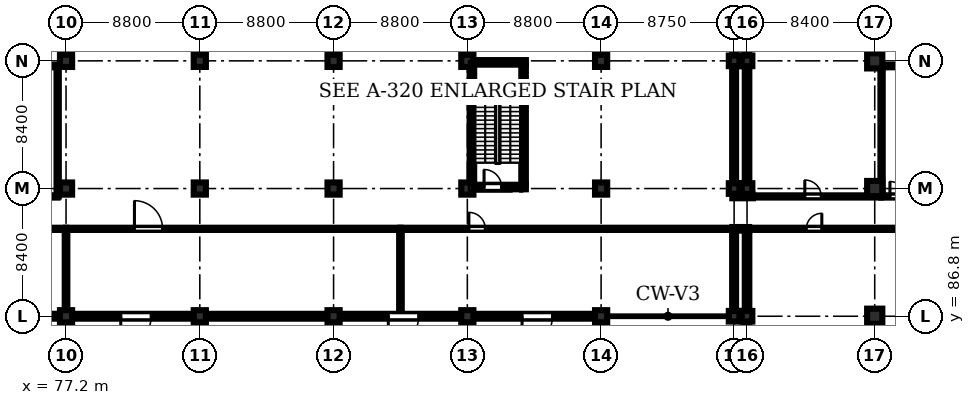
"""IFC4 building model, lengths in metres.
Left out: names, types, materials, properties, quantities, classifications, styles, units other than length and angle.
Written with IfcOpenShell. Run it as: python <this file> out.ifc"""

import sys

from ifc_helpers import new_model, si_unit, direction, frame, frame_2d, origin, origin_2d, place, context, subcontext, project, spatial, rectangle, extrude, element, fill, save


model = new_model("IFC4")
c1 = context("Model", 3, precision=1e-05, world=origin(), true_north=direction((0.0, 1.0)))
c2 = subcontext(c1, "Body", "Model", "MODEL_VIEW")
j1 = project(units=[si_unit("LENGTHUNIT", "METRE"), si_unit("PLANEANGLEUNIT", "RADIAN")], contexts=[c1])
p1 = place(None, origin())
s1 = spatial("IfcSite", under=j1, at=p1, CompositionType="ELEMENT")
p2 = place(p1, origin())
s2 = spatial("IfcBuilding", under=s1, at=p2, CompositionType="ELEMENT")
p3 = place(p2, origin())
s3 = spatial("IfcBuildingStorey", under=s2, at=p3, CompositionType="ELEMENT", Elevation=0.0)
for number, where, z_axis, x_axis in (
    (1, (77.2, 86.8, 0.0), (0.0, 0.0, 1.0), (1.0, 0.0, 0.0)),
    (2, (77.2, 95.2, 0.0), (0.0, 0.0, 1.0), (1.0, 0.0, 0.0)),
    (3, (77.2, 103.6, 0.0), (0.0, 0.0, 1.0), (1.0, 0.0, 0.0)),
    (4, (86.0, 86.8, 0.0), (0.0, 0.0, 1.0), (1.0, 0.0, 0.0)),
    (5, (86.0, 95.2, 0.0), (0.0, 0.0, 1.0), (1.0, 0.0, 0.0)),
    (6, (86.0, 103.6, 0.0), (0.0, 0.0, 1.0), (1.0, 0.0, 0.0)),
    (7, (94.8, 86.8, 0.0), (0.0, 0.0, 1.0), (1.0, 0.0, 0.0)),
    (8, (94.8, 95.2, 0.0), (0.0, 0.0, 1.0), (1.0, 0.0, 0.0)),
    (9, (94.8, 103.6, 0.0), (0.0, 0.0, 1.0), (1.0, 0.0, 0.0)),
    (10, (103.6, 86.8, 0.0), (0.0, 0.0, 1.0), (1.0, 0.0, 0.0)),
    (11, (103.6, 95.2, 0.0), (0.0, 0.0, 1.0), (1.0, 0.0, 0.0)),
    (12, (103.6, 103.6, 0.0), (0.0, 0.0, 1.0), (1.0, 0.0, 0.0)),
    (13, (112.4, 86.8, 0.0), (0.0, 0.0, 1.0), (1.0, 0.0, 0.0)),
    (14, (112.4, 95.2, 0.0), (0.0, 0.0, 1.0), (1.0, 0.0, 0.0)),
    (15, (112.4, 103.6, 0.0), (0.0, 0.0, 1.0), (1.0, 0.0, 0.0)),
):
    element("IfcColumn", number, at=place(p3, frame(where, z_axis=z_axis, x_axis=x_axis)), inside=s3, PredefinedType="COLUMN", context=c2, shape_type="SweptSolid", body=[
        extrude(rectangle(XDim=0.8, YDim=0.8, at=origin_2d()), origin(), (0.0, 0.0, 1.0), 5.18),
    ])
for number, where, z_axis, x_axis in (
    (16, (121.15, 86.8, 0.0), (0.0, 0.0, 1.0), (1.0, 0.0, 0.0)),
    (17, (121.15, 95.2, 0.0), (0.0, 0.0, 1.0), (1.0, 0.0, 0.0)),
    (18, (121.15, 103.6, 0.0), (0.0, 0.0, 1.0), (1.0, 0.0, 0.0)),
    (19, (122.0, 86.8, 0.0), (0.0, 0.0, 1.0), (1.0, 0.0, 0.0)),
    (20, (122.0, 95.2, 0.0), (0.0, 0.0, 1.0), (1.0, 0.0, 0.0)),
    (21, (122.0, 103.6, 0.0), (0.0, 0.0, 1.0), (1.0, 0.0, 0.0)),
):
    element("IfcColumn", number, at=place(p3, frame(where, z_axis=z_axis, x_axis=x_axis)), inside=s3, PredefinedType="COLUMN", context=c2, shape_type="SweptSolid", body=[
        extrude(rectangle(XDim=0.7, YDim=0.7, at=origin_2d()), origin(), (0.0, 0.0, 1.0), 5.18),
    ])
for number, where, z_axis, x_axis in (
    (22, (130.4, 86.8, 0.0), (0.0, 0.0, 1.0), (1.0, 0.0, 0.0)),
    (23, (130.4, 95.2, 0.0), (0.0, 0.0, 1.0), (1.0, 0.0, 0.0)),
    (24, (130.4, 103.6, 0.0), (0.0, 0.0, 1.0), (1.0, 0.0, 0.0)),
):
    element("IfcColumn", number, at=place(p3, frame(where, z_axis=z_axis, x_axis=x_axis)), inside=s3, PredefinedType="COLUMN", context=c2, shape_type="SweptSolid", body=[
        extrude(rectangle(XDim=1.0, YDim=1.0, at=origin_2d()), origin(), (0.0, 0.0, 1.0), 5.18),
    ])
p4 = place(p3, frame((103.75, 95.3, 0.0), z_axis=(0.0, 0.0, 1.0), x_axis=(1.0, 0.0, 0.0)))
e25 = element("IfcWall", 25, at=p4, inside=s3, PredefinedType="SHEAR", context=c2, shape_type="SweptSolid", body=[
    extrude(rectangle(XDim=3.7, YDim=0.3, at=frame_2d((1.85, 0.0))), origin(), (0.0, 0.0, 1.0), 5.18),
])
p5 = place(p4, frame((0.95, 0.0, 0.0)))
e26 = element("IfcOpeningElement", 26, at=p5, cuts=e25, PredefinedType="OPENING", context=c2, shape_type="SweptSolid", body=[
    extrude(rectangle(XDim=1.15, YDim=2.15, at=frame_2d((0.575, 1.075))), frame((0.0, 0.16, 0.0), z_axis=(0.0, -1.0, 0.0), x_axis=(1.0, 0.0, 0.0)), (0.0, 0.0, 1.0), 0.32),
])
p6 = place(p3, frame((103.75, 103.5, 0.0), z_axis=(0.0, 0.0, 1.0), x_axis=(1.0, 0.0, 0.0)))
e27 = element("IfcWall", 27, at=p6, inside=s3, PredefinedType="SHEAR", context=c2, shape_type="SweptSolid", body=[
    extrude(rectangle(XDim=3.7, YDim=0.3, at=frame_2d((1.85, 0.0))), origin(), (0.0, 0.0, 1.0), 5.18),
])
for number, where, z_axis, x_axis in (
    (28, (103.9, 95.45, 0.0), (0.0, 0.0, 1.0), (0.0, 1.0, 0.0)),
    (29, (107.3, 95.45, 0.0), (0.0, 0.0, 1.0), (0.0, 1.0, 0.0)),
):
    element("IfcWall", number, at=place(p3, frame(where, z_axis=z_axis, x_axis=x_axis)), inside=s3, PredefinedType="SHEAR", context=c2, shape_type="SweptSolid", body=[
        extrude(rectangle(XDim=7.9, YDim=0.3, at=frame_2d((3.95, 0.0))), origin(), (0.0, 0.0, 1.0), 5.18),
    ])
p7 = place(p3, frame((76.8, 86.8, 0.0), z_axis=(0.0, 0.0, 1.0), x_axis=(-1.0, 0.0, 0.0)))
e30 = element("IfcWall", 30, at=p7, inside=s3, PredefinedType="STANDARD", context=c2, shape_type="SweptSolid", body=[
    extrude(rectangle(XDim=8.0, YDim=0.32, at=frame_2d((4.0, 0.0))), origin(), (0.0, 0.0, 1.0), 4.53),
])
p8 = place(p7, frame((2.8, 0.0, 0.95)))
e31 = element("IfcOpeningElement", 31, at=p8, cuts=e30, PredefinedType="OPENING", context=c2, shape_type="SweptSolid", body=[
    extrude(rectangle(XDim=2.0, YDim=2.2, at=frame_2d((1.0, 1.1))), frame((0.0, 0.17, 0.0), z_axis=(0.0, -1.0, 0.0), x_axis=(1.0, 0.0, 0.0)), (0.0, 0.0, 1.0), 0.34),
])
p9 = place(p3, frame((85.6, 86.8, 0.0), z_axis=(0.0, 0.0, 1.0), x_axis=(-1.0, 0.0, 0.0)))
e32 = element("IfcWall", 32, at=p9, inside=s3, PredefinedType="STANDARD", context=c2, shape_type="SweptSolid", body=[
    extrude(rectangle(XDim=8.0, YDim=0.32, at=frame_2d((4.0, 0.0))), origin(), (0.0, 0.0, 1.0), 4.53),
])
p10 = place(p9, frame((2.8, 0.0, 0.0)))
e33 = element("IfcOpeningElement", 33, at=p10, cuts=e32, PredefinedType="OPENING", context=c2, shape_type="SweptSolid", body=[
    extrude(rectangle(XDim=2.0, YDim=2.4, at=frame_2d((1.0, 1.2))), frame((0.0, 0.17, 0.0), z_axis=(0.0, -1.0, 0.0), x_axis=(1.0, 0.0, 0.0)), (0.0, 0.0, 1.0), 0.34),
])
p11 = place(p3, frame((94.4, 86.8, 0.0), z_axis=(0.0, 0.0, 1.0), x_axis=(-1.0, 0.0, 0.0)))
e34 = element("IfcWall", 34, at=p11, inside=s3, PredefinedType="STANDARD", context=c2, shape_type="SweptSolid", body=[
    extrude(rectangle(XDim=8.0, YDim=0.32, at=frame_2d((4.0, 0.0))), origin(), (0.0, 0.0, 1.0), 4.53),
])
p12 = place(p11, frame((2.8, 0.0, 0.95)))
e35 = element("IfcOpeningElement", 35, at=p12, cuts=e34, PredefinedType="OPENING", context=c2, shape_type="SweptSolid", body=[
    extrude(rectangle(XDim=2.0, YDim=2.2, at=frame_2d((1.0, 1.1))), frame((0.0, 0.17, 0.0), z_axis=(0.0, -1.0, 0.0), x_axis=(1.0, 0.0, 0.0)), (0.0, 0.0, 1.0), 0.34),
])
p13 = place(p3, frame((103.2, 86.8, 0.0), z_axis=(0.0, 0.0, 1.0), x_axis=(-1.0, 0.0, 0.0)))
e36 = element("IfcWall", 36, at=p13, inside=s3, PredefinedType="STANDARD", context=c2, shape_type="SweptSolid", body=[
    extrude(rectangle(XDim=8.0, YDim=0.32, at=frame_2d((4.0, 0.0))), origin(), (0.0, 0.0, 1.0), 4.53),
])
p14 = place(p13, frame((2.8, 0.0, 0.0)))
e37 = element("IfcOpeningElement", 37, at=p14, cuts=e36, PredefinedType="OPENING", context=c2, shape_type="SweptSolid", body=[
    extrude(rectangle(XDim=2.0, YDim=2.4, at=frame_2d((1.0, 1.2))), frame((0.0, 0.17, 0.0), z_axis=(0.0, -1.0, 0.0), x_axis=(1.0, 0.0, 0.0)), (0.0, 0.0, 1.0), 0.34),
])
p15 = place(p3, frame((112.0, 86.8, 0.0), z_axis=(0.0, 0.0, 1.0), x_axis=(-1.0, 0.0, 0.0)))
e38 = element("IfcWall", 38, at=p15, inside=s3, PredefinedType="STANDARD", context=c2, shape_type="SweptSolid", body=[
    extrude(rectangle(XDim=8.0, YDim=0.32, at=frame_2d((4.0, 0.0))), origin(), (0.0, 0.0, 1.0), 4.53),
])
p16 = place(p15, frame((2.8, 0.0, 0.0)))
e39 = element("IfcOpeningElement", 39, at=p16, cuts=e38, PredefinedType="OPENING", context=c2, shape_type="SweptSolid", body=[
    extrude(rectangle(XDim=2.0, YDim=2.4, at=frame_2d((1.0, 1.2))), frame((0.0, 0.17, 0.0), z_axis=(0.0, -1.0, 0.0), x_axis=(1.0, 0.0, 0.0)), (0.0, 0.0, 1.0), 0.34),
])
p17 = place(p3, frame((121.15, 92.42, 0.0), z_axis=(0.0, 0.0, 1.0), x_axis=(0.0, -1.0, 0.0)))
e40 = element("IfcWall", 40, at=p17, inside=s3, PredefinedType="STANDARD", context=c2, shape_type="SweptSolid", body=[
    extrude(rectangle(XDim=5.27, YDim=0.26, at=frame_2d((2.635, 0.0))), origin(), (0.0, 0.0, 1.0), 4.53),
])
p18 = place(p3, frame((121.15, 103.25, 0.0), z_axis=(0.0, 0.0, 1.0), x_axis=(0.0, -1.0, 0.0)))
e41 = element("IfcWall", 41, at=p18, inside=s3, PredefinedType="STANDARD", context=c2, shape_type="SweptSolid", body=[
    extrude(rectangle(XDim=7.7, YDim=0.26, at=frame_2d((3.85, 0.0))), origin(), (0.0, 0.0, 1.0), 4.53),
])
p19 = place(p3, frame((121.15, 107.42, 0.0), z_axis=(0.0, 0.0, 1.0), x_axis=(0.0, -1.0, 0.0)))
e42 = element("IfcWall", 42, at=p19, inside=s3, PredefinedType="STANDARD", context=c2, shape_type="SweptSolid", body=[
    extrude(rectangle(XDim=3.47, YDim=0.26, at=frame_2d((1.735, 0.0))), origin(), (0.0, 0.0, 1.0), 4.53),
])
p20 = place(p3, frame((122.0, 78.75, 0.0), z_axis=(0.0, 0.0, 1.0), x_axis=(0.0, 1.0, 0.0)))
e43 = element("IfcWall", 43, at=p20, inside=s3, PredefinedType="STANDARD", context=c2, shape_type="SweptSolid", body=[
    extrude(rectangle(XDim=7.7, YDim=0.3, at=frame_2d((3.85, 0.0))), origin(), (0.0, 0.0, 1.0), 4.43),
])
p21 = place(p3, frame((122.0, 87.15, 0.0), z_axis=(0.0, 0.0, 1.0), x_axis=(0.0, 1.0, 0.0)))
e44 = element("IfcWall", 44, at=p21, inside=s3, PredefinedType="STANDARD", context=c2, shape_type="SweptSolid", body=[
    extrude(rectangle(XDim=5.27, YDim=0.3, at=frame_2d((2.635, 0.0))), origin(), (0.0, 0.0, 1.0), 4.43),
])
p22 = place(p3, frame((122.14, 92.55, 0.0), z_axis=(0.0, 0.0, 1.0), x_axis=(-1.0, 0.0, 0.0)))
e45 = element("IfcWall", 45, at=p22, inside=s3, PredefinedType="STANDARD", context=c2, shape_type="SweptSolid", body=[
    extrude(rectangle(XDim=1.11, YDim=0.24, at=frame_2d((0.555, 0.0))), origin(), (0.0, 0.0, 1.0), 5.18),
])
p23 = place(p3, frame((121.03, 94.68, 0.0), z_axis=(0.0, 0.0, 1.0), x_axis=(1.0, 0.0, 0.0)))
e46 = element("IfcWall", 46, at=p23, inside=s3, PredefinedType="STANDARD", context=c2, shape_type="SweptSolid", body=[
    extrude(rectangle(XDim=1.36, YDim=0.24, at=frame_2d((0.68, 0.0))), origin(), (0.0, 0.0, 1.0), 5.18),
])
p24 = place(p3, frame((122.0, 95.55, 0.0), z_axis=(0.0, 0.0, 1.0), x_axis=(0.0, 1.0, 0.0)))
e47 = element("IfcWall", 47, at=p24, inside=s3, PredefinedType="STANDARD", context=c2, shape_type="SweptSolid", body=[
    extrude(rectangle(XDim=7.7, YDim=0.3, at=frame_2d((3.85, 0.0))), origin(), (0.0, 0.0, 1.0), 4.43),
])
p25 = place(p3, frame((122.0, 103.95, 0.0), z_axis=(0.0, 0.0, 1.0), x_axis=(0.0, 1.0, 0.0)))
e48 = element("IfcWall", 48, at=p25, inside=s3, PredefinedType="STANDARD", context=c2, shape_type="SweptSolid", body=[
    extrude(rectangle(XDim=3.54, YDim=0.3, at=frame_2d((1.77, 0.0))), origin(), (0.0, 0.0, 1.0), 4.43),
])
p26 = place(p3, frame((69.25, 94.68, 0.0), z_axis=(0.0, 0.0, 1.0), x_axis=(1.0, 0.0, 0.0)))
e49 = element("IfcWall", 49, at=p26, inside=s3, PredefinedType="PARTITIONING", context=c2, shape_type="SweptSolid", body=[
    extrude(rectangle(XDim=7.4, YDim=0.15, at=frame_2d((3.7, 0.0))), origin(), (0.0, 0.0, 1.0), 5.18),
])
p27 = place(p26, frame((1.15, 0.0, 0.0)))
e50 = element("IfcOpeningElement", 50, at=p27, cuts=e49, PredefinedType="OPENING", context=c2, shape_type="SweptSolid", body=[
    extrude(rectangle(XDim=1.0, YDim=2.12, at=frame_2d((0.5, 1.06))), frame((0.0, 0.085, 0.0), z_axis=(0.0, -1.0, 0.0), x_axis=(1.0, 0.0, 0.0)), (0.0, 0.0, 1.0), 0.17),
])
p28 = place(p26, frame((4.55, 0.0, 0.0)))
e51 = element("IfcOpeningElement", 51, at=p28, cuts=e49, PredefinedType="OPENING", context=c2, shape_type="SweptSolid", body=[
    extrude(rectangle(XDim=0.92, YDim=2.1, at=frame_2d((0.46, 1.05))), frame((0.0, 0.085, 0.0), z_axis=(0.0, -1.0, 0.0), x_axis=(1.0, 0.0, 0.0)), (0.0, 0.0, 1.0), 0.17),
])
p29 = place(p3, frame((69.25, 103.25, 0.0), z_axis=(0.0, 0.0, 1.0), x_axis=(1.0, 0.0, 0.0)))
e52 = element("IfcWall", 52, at=p29, inside=s3, PredefinedType="PARTITIONING", context=c2, shape_type="SweptSolid", body=[
    extrude(rectangle(XDim=7.4, YDim=0.15, at=frame_2d((3.7, 0.0))), origin(), (0.0, 0.0, 1.0), 5.18),
])
p30 = place(p3, frame((76.65, 94.68, 0.0), z_axis=(0.0, 0.0, 1.0), x_axis=(0.0, 1.0, 0.0)))
e53 = element("IfcWall", 53, at=p30, inside=s3, PredefinedType="PARTITIONING", context=c2, shape_type="SweptSolid", body=[
    extrude(rectangle(XDim=8.57, YDim=0.15, at=frame_2d((4.285, 0.0))), origin(), (0.0, 0.0, 1.0), 5.18),
])
p31 = place(p3, frame((50.92, 92.55, 0.0), z_axis=(0.0, 0.0, 1.0), x_axis=(1.0, 0.0, 0.0)))
e54 = element("IfcWall", 54, at=p31, inside=s3, PredefinedType="PARTITIONING", context=c2, shape_type="SweptSolid", body=[
    extrude(rectangle(XDim=26.28, YDim=0.145, at=frame_2d((13.14, 0.0))), origin(), (0.0, 0.0, 1.0), 5.18),
])
p32 = place(p31, frame((4.5, 0.0, 0.0)))
e55 = element("IfcOpeningElement", 55, at=p32, cuts=e54, PredefinedType="OPENING", context=c2, shape_type="SweptSolid", body=[
    extrude(rectangle(XDim=1.85, YDim=2.25, at=frame_2d((0.925, 1.125))), frame((0.0, 0.083, 0.0), z_axis=(0.0, -1.0, 0.0), x_axis=(1.0, 0.0, 0.0)), (0.0, 0.0, 1.0), 0.165),
])
p33 = place(p3, frame((77.2, 92.55, 0.0), z_axis=(0.0, 0.0, 1.0), x_axis=(1.0, 0.0, 0.0)))
e56 = element("IfcWall", 56, at=p33, inside=s3, PredefinedType="PARTITIONING", context=c2, shape_type="SweptSolid", body=[
    extrude(rectangle(XDim=22.0, YDim=0.145, at=frame_2d((11.0, 0.0))), origin(), (0.0, 0.0, 1.0), 5.18),
])
p34 = place(p33, frame((4.5, 0.0, 0.0)))
e57 = element("IfcOpeningElement", 57, at=p34, cuts=e56, PredefinedType="OPENING", context=c2, shape_type="SweptSolid", body=[
    extrude(rectangle(XDim=1.85, YDim=2.25, at=frame_2d((0.925, 1.125))), frame((0.0, 0.083, 0.0), z_axis=(0.0, -1.0, 0.0), x_axis=(1.0, 0.0, 0.0)), (0.0, 0.0, 1.0), 0.165),
])
p35 = place(p3, frame((77.2, 86.95, 0.0), z_axis=(0.0, 0.0, 1.0), x_axis=(0.0, 1.0, 0.0)))
e58 = element("IfcWall", 58, at=p35, inside=s3, PredefinedType="PARTITIONING", context=c2, shape_type="SweptSolid", body=[
    extrude(rectangle(XDim=5.6, YDim=0.172, at=frame_2d((2.8, 0.0))), origin(), (0.0, 0.0, 1.0), 4.53),
])
p36 = place(p3, frame((99.2, 92.55, 0.0), z_axis=(0.0, 0.0, 1.0), x_axis=(1.0, 0.0, 0.0)))
e59 = element("IfcWall", 59, at=p36, inside=s3, PredefinedType="PARTITIONING", context=c2, shape_type="SweptSolid", body=[
    extrude(rectangle(XDim=21.82, YDim=0.145, at=frame_2d((10.91, 0.0))), origin(), (0.0, 0.0, 1.0), 5.18),
])
p37 = place(p36, frame((4.5, 0.0, 0.0)))
e60 = element("IfcOpeningElement", 60, at=p37, cuts=e59, PredefinedType="OPENING", context=c2, shape_type="SweptSolid", body=[
    extrude(rectangle(XDim=1.08, YDim=2.15, at=frame_2d((0.54, 1.075))), frame((0.0, 0.083, 0.0), z_axis=(0.0, -1.0, 0.0), x_axis=(1.0, 0.0, 0.0)), (0.0, 0.0, 1.0), 0.165),
])
p38 = place(p3, frame((99.2, 86.95, 0.0), z_axis=(0.0, 0.0, 1.0), x_axis=(0.0, 1.0, 0.0)))
e61 = element("IfcWall", 61, at=p38, inside=s3, PredefinedType="PARTITIONING", context=c2, shape_type="SweptSolid", body=[
    extrude(rectangle(XDim=5.6, YDim=0.172, at=frame_2d((2.8, 0.0))), origin(), (0.0, 0.0, 1.0), 4.73),
])
p39 = place(p3, frame((130.85, 94.68, 0.0), z_axis=(0.0, 0.0, 1.0), x_axis=(1.0, 0.0, 0.0)))
e62 = element("IfcWall", 62, at=p39, inside=s3, PredefinedType="PARTITIONING", context=c2, shape_type="SweptSolid", body=[
    extrude(rectangle(XDim=5.35, YDim=0.15, at=frame_2d((2.675, 0.0))), origin(), (0.0, 0.0, 1.0), 5.18),
])
p40 = place(p39, frame((0.55, 0.0, 0.0)))
e63 = element("IfcOpeningElement", 63, at=p40, cuts=e62, PredefinedType="OPENING", context=c2, shape_type="SweptSolid", body=[
    extrude(rectangle(XDim=0.98, YDim=2.12, at=frame_2d((0.49, 1.06))), frame((0.0, 0.085, 0.0), z_axis=(0.0, -1.0, 0.0), x_axis=(1.0, 0.0, 0.0)), (0.0, 0.0, 1.0), 0.17),
])
p41 = place(p3, frame((130.85, 103.25, 0.0), z_axis=(0.0, 0.0, 1.0), x_axis=(1.0, 0.0, 0.0)))
e64 = element("IfcWall", 64, at=p41, inside=s3, PredefinedType="PARTITIONING", context=c2, shape_type="SweptSolid", body=[
    extrude(rectangle(XDim=5.35, YDim=0.15, at=frame_2d((2.675, 0.0))), origin(), (0.0, 0.0, 1.0), 5.18),
])
p42 = place(p3, frame((130.85, 94.68, 0.0), z_axis=(0.0, 0.0, 1.0), x_axis=(0.0, 1.0, 0.0)))
e65 = element("IfcWall", 65, at=p42, inside=s3, PredefinedType="PARTITIONING", context=c2, shape_type="SweptSolid", body=[
    extrude(rectangle(XDim=8.57, YDim=0.15, at=frame_2d((4.285, 0.0))), origin(), (0.0, 0.0, 1.0), 5.18),
])
p43 = place(p3, frame((122.4, 94.68, 0.0), z_axis=(0.0, 0.0, 1.0), x_axis=(1.0, 0.0, 0.0)))
e66 = element("IfcWall", 66, at=p43, inside=s3, PredefinedType="PARTITIONING", context=c2, shape_type="SweptSolid", body=[
    extrude(rectangle(XDim=8.4, YDim=0.145, at=frame_2d((4.2, 0.0))), origin(), (0.0, 0.0, 1.0), 5.18),
])
p44 = place(p43, frame((3.4, 0.0, 0.0)))
e67 = element("IfcOpeningElement", 67, at=p44, cuts=e66, PredefinedType="OPENING", context=c2, shape_type="SweptSolid", body=[
    extrude(rectangle(XDim=1.08, YDim=2.15, at=frame_2d((0.54, 1.075))), frame((0.0, 0.083, 0.0), z_axis=(0.0, -1.0, 0.0), x_axis=(1.0, 0.0, 0.0)), (0.0, 0.0, 1.0), 0.165),
])
p45 = place(p3, frame((122.15, 92.55, 0.0), z_axis=(0.0, 0.0, 1.0), x_axis=(1.0, 0.0, 0.0)))
e68 = element("IfcWall", 68, at=p45, inside=s3, PredefinedType="PARTITIONING", context=c2, shape_type="SweptSolid", body=[
    extrude(rectangle(XDim=12.45, YDim=0.145, at=frame_2d((6.225, 0.0))), origin(), (0.0, 0.0, 1.0), 5.18),
])
p46 = place(p45, frame((3.75, 0.0, 0.0)))
e69 = element("IfcOpeningElement", 69, at=p46, cuts=e68, PredefinedType="OPENING", context=c2, shape_type="SweptSolid", body=[
    extrude(rectangle(XDim=1.02, YDim=2.15, at=frame_2d((0.51, 1.075))), frame((0.0, 0.083, 0.0), z_axis=(0.0, -1.0, 0.0), x_axis=(1.0, 0.0, 0.0)), (0.0, 0.0, 1.0), 0.165),
])
p47 = place(p10, origin())
e70 = element("IfcDoor", 70, at=p47, inside=s3, OperationType="SINGLE_SWING_RIGHT", PredefinedType="DOOR", context=c2, shape_type="SweptSolid", body=[
    extrude(rectangle(XDim=2.0, YDim=2.4, at=frame_2d((1.0, 1.2))), frame((0.0, 0.025, 0.0), z_axis=(0.0, -1.0, 0.0), x_axis=(1.0, 0.0, 0.0)), (0.0, 0.0, 1.0), 0.05),
])
fill(e33, e70)
p48 = place(p12, origin())
e71 = element("IfcWindow", 71, at=p48, inside=s3, PartitioningType="DOUBLE_PANEL_VERTICAL", PredefinedType="WINDOW", context=c2, shape_type="SweptSolid", body=[
    extrude(rectangle(XDim=2.0, YDim=2.2, at=frame_2d((1.0, 1.1))), frame((0.0, 0.03, 0.0), z_axis=(0.0, -1.0, 0.0), x_axis=(1.0, 0.0, 0.0)), (0.0, 0.0, 1.0), 0.06),
])
fill(e35, e71)
p49 = place(p14, origin())
e72 = element("IfcDoor", 72, at=p49, inside=s3, OperationType="SINGLE_SWING_RIGHT", PredefinedType="DOOR", context=c2, shape_type="SweptSolid", body=[
    extrude(rectangle(XDim=2.0, YDim=2.4, at=frame_2d((1.0, 1.2))), frame((0.0, 0.025, 0.0), z_axis=(0.0, -1.0, 0.0), x_axis=(1.0, 0.0, 0.0)), (0.0, 0.0, 1.0), 0.05),
])
fill(e37, e72)
p50 = place(p16, origin())
e73 = element("IfcDoor", 73, at=p50, inside=s3, OperationType="SINGLE_SWING_RIGHT", PredefinedType="DOOR", context=c2, shape_type="SweptSolid", body=[
    extrude(rectangle(XDim=2.0, YDim=2.4, at=frame_2d((1.0, 1.2))), frame((0.0, 0.025, 0.0), z_axis=(0.0, -1.0, 0.0), x_axis=(1.0, 0.0, 0.0)), (0.0, 0.0, 1.0), 0.05),
])
fill(e39, e73)
p51 = place(p34, origin())
e74 = element("IfcDoor", 74, at=p51, inside=s3, OperationType="SINGLE_SWING_LEFT", PredefinedType="DOOR", context=c2, shape_type="SweptSolid", body=[
    extrude(rectangle(XDim=1.85, YDim=2.25, at=frame_2d((0.925, 1.125))), frame((0.0, 0.025, 0.0), z_axis=(0.0, -1.0, 0.0), x_axis=(1.0, 0.0, 0.0)), (0.0, 0.0, 1.0), 0.05),
])
fill(e57, e74)
p52 = place(p37, origin())
e75 = element("IfcDoor", 75, at=p52, inside=s3, OperationType="SINGLE_SWING_LEFT", PredefinedType="DOOR", context=c2, shape_type="SweptSolid", body=[
    extrude(rectangle(XDim=1.08, YDim=2.15, at=frame_2d((0.54, 1.075))), frame((0.0, 0.025, 0.0), z_axis=(0.0, -1.0, 0.0), x_axis=(1.0, 0.0, 0.0)), (0.0, 0.0, 1.0), 0.05),
])
fill(e60, e75)
p53 = place(p40, origin())
e76 = element("IfcDoor", 76, at=p53, inside=s3, OperationType="SINGLE_SWING_LEFT", PredefinedType="DOOR", context=c2, shape_type="SweptSolid", body=[
    extrude(rectangle(XDim=0.98, YDim=2.12, at=frame_2d((0.49, 1.06))), frame((0.0, 0.025, 0.0), z_axis=(0.0, -1.0, 0.0), x_axis=(1.0, 0.0, 0.0)), (0.0, 0.0, 1.0), 0.05),
])
fill(e63, e76)
p54 = place(p44, origin())
e77 = element("IfcDoor", 77, at=p54, inside=s3, OperationType="SINGLE_SWING_LEFT", PredefinedType="DOOR", context=c2, shape_type="SweptSolid", body=[
    extrude(rectangle(XDim=1.08, YDim=2.15, at=frame_2d((0.54, 1.075))), frame((0.0, 0.025, 0.0), z_axis=(0.0, -1.0, 0.0), x_axis=(1.0, 0.0, 0.0)), (0.0, 0.0, 1.0), 0.05),
])
fill(e67, e77)
p55 = place(p46, origin())
e78 = element("IfcDoor", 78, at=p55, inside=s3, OperationType="SINGLE_SWING_RIGHT", PredefinedType="DOOR", context=c2, shape_type="SweptSolid", body=[
    extrude(rectangle(XDim=1.02, YDim=2.15, at=frame_2d((0.51, 1.075))), frame((0.0, 0.025, 0.0), z_axis=(0.0, -1.0, 0.0), x_axis=(1.0, 0.0, 0.0)), (0.0, 0.0, 1.0), 0.05),
])
fill(e69, e78)
p56 = place(p5, origin())
e79 = element("IfcDoor", 79, at=p56, inside=s3, OperationType="SINGLE_SWING_LEFT", PredefinedType="DOOR", context=c2, shape_type="SweptSolid", body=[
    extrude(rectangle(XDim=1.15, YDim=2.15, at=frame_2d((0.575, 1.075))), frame((0.0, 0.025, 0.0), z_axis=(0.0, -1.0, 0.0), x_axis=(1.0, 0.0, 0.0)), (0.0, 0.0, 1.0), 0.05),
])
fill(e26, e79)
save(model, sys.argv[1])
